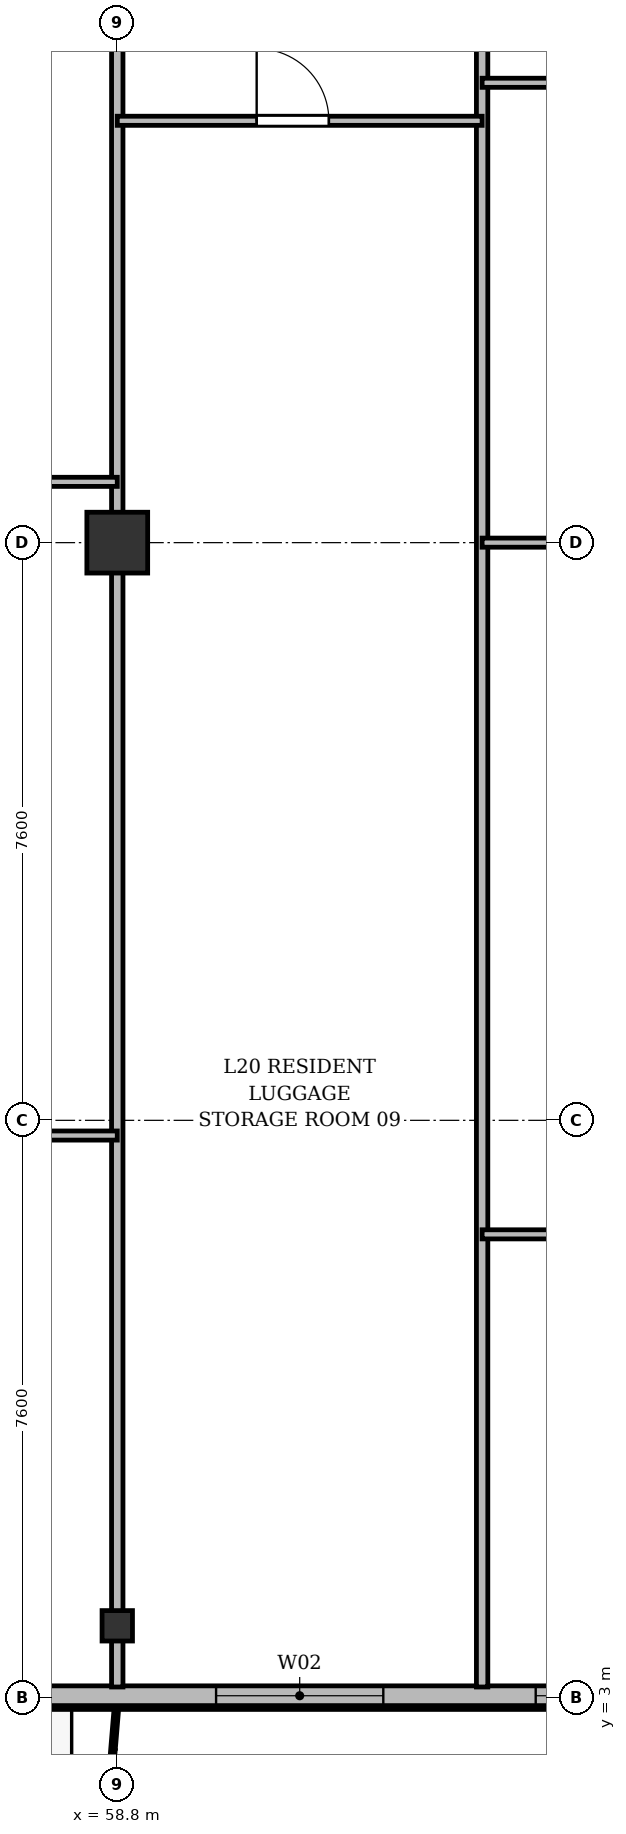
"""IFC4 building model, lengths in metres.
Left out: names, types, materials, properties, quantities, classifications, styles, units other than length and angle.
Written with IfcOpenShell. Run it as: python <this file> out.ifc"""

import sys

from ifc_helpers import new_model, si_unit, direction, frame, frame_2d, origin, origin_2d, place, context, subcontext, project, spatial, rectangle, i_section, extrude, source, transform, mapped, element, fill, save


model = new_model("IFC4")
c1 = context("Model", 3, precision=1e-05, world=origin(), true_north=direction((0.0, 1.0)))
c2 = subcontext(c1, "Body", "Model", "MODEL_VIEW")
j1 = project(units=[si_unit("LENGTHUNIT", "METRE"), si_unit("PLANEANGLEUNIT", "RADIAN")], contexts=[c1])
p1 = place(None, origin())
s1 = spatial("IfcSite", under=j1, at=p1, CompositionType="ELEMENT")
p2 = place(p1, origin())
s2 = spatial("IfcBuilding", under=s1, at=p2, CompositionType="ELEMENT")
p3 = place(p2, frame((0.0, 0.0, 81.7)))
s3 = spatial("IfcBuildingStorey", under=s2, at=p3, CompositionType="ELEMENT", Elevation=81.7)
m1 = source(origin(), c2, "Body", "SweptSolid", [
    extrude(i_section(OverallWidth=0.4, OverallDepth=0.4, WebThickness=0.022, FlangeThickness=0.035, at=origin_2d()), origin(), (0.0, 0.0, 1.0), 3.6),
])
p4 = place(p3, frame((58.8, 3.95, 0.0), z_axis=(0.0, 0.0, 1.0), x_axis=(1.0, 0.0, 0.0)))
e1 = element("IfcColumn", 1, at=p4, inside=s3, PredefinedType="COLUMN", context=c2, shape_type="MappedRepresentation", body=[
    mapped(m1, transform((0.0, 0.0, 0.0), x_axis=(1.0, 0.0, 0.0), y_axis=(0.0, 1.0, 0.0), z_axis=(0.0, 0.0, 1.0), scale=1.0)),
])
m2 = source(origin(), c2, "Body", "SweptSolid", [
    extrude(rectangle(XDim=0.8, YDim=0.8, at=origin_2d()), origin(), (0.0, 0.0, 1.0), 3.6),
])
p5 = place(p3, frame((58.8, 18.2, 0.0), z_axis=(0.0, 0.0, 1.0), x_axis=(1.0, 0.0, 0.0)))
e2 = element("IfcColumn", 2, at=p5, inside=s3, PredefinedType="COLUMN", context=c2, shape_type="MappedRepresentation", body=[
    mapped(m2, transform((0.0, 0.0, 0.0), x_axis=(1.0, 0.0, 0.0), y_axis=(0.0, 1.0, 0.0), z_axis=(0.0, 0.0, 1.0), scale=1.0)),
])
p6 = place(p3, frame((66.9, 3.03, 0.0), z_axis=(0.0, 0.0, 1.0), x_axis=(-1.0, 0.0, 0.0)))
e3 = element("IfcWall", 3, at=p6, inside=s3, PredefinedType="SOLIDWALL", context=c2, shape_type="SweptSolid", body=[
    extrude(rectangle(XDim=59.4, YDim=0.26, at=frame_2d((29.7, 0.0))), origin(), (0.0, 0.0, 1.0), 3.34),
])
p7 = place(p6, frame((0.795, 0.0, 0.9)))
e4 = element("IfcOpeningElement", 4, at=p7, cuts=e3, PredefinedType="OPENING", context=c2, shape_type="SweptSolid", body=[
    extrude(rectangle(XDim=1.8, YDim=1.8, at=frame_2d((0.9, 0.9))), frame((0.0, 0.14, 0.0), z_axis=(0.0, -1.0, 0.0), x_axis=(1.0, 0.0, 0.0)), (0.0, 0.0, 1.0), 0.28),
])
p8 = place(p6, frame((4.6, 0.0, 0.9)))
e5 = element("IfcOpeningElement", 5, at=p8, cuts=e3, PredefinedType="OPENING", context=c2, shape_type="SweptSolid", body=[
    extrude(rectangle(XDim=2.2, YDim=1.8, at=frame_2d((1.1, 0.9))), frame((0.0, 0.14, 0.0), z_axis=(0.0, -1.0, 0.0), x_axis=(1.0, 0.0, 0.0)), (0.0, 0.0, 1.0), 0.28),
])
p9 = place(p6, frame((9.18, 0.0, 0.0)))
e6 = element("IfcOpeningElement", 6, at=p9, cuts=e3, PredefinedType="OPENING", context=c2, shape_type="SweptSolid", body=[
    extrude(rectangle(XDim=1.2, YDim=2.2, at=frame_2d((0.6, 1.1))), frame((0.0, 0.14, 0.0), z_axis=(0.0, -1.0, 0.0), x_axis=(1.0, 0.0, 0.0)), (0.0, 0.0, 1.0), 0.28),
])
p10 = place(p6, frame((12.95, 0.0, 0.9)))
e7 = element("IfcOpeningElement", 7, at=p10, cuts=e3, PredefinedType="OPENING", context=c2, shape_type="SweptSolid", body=[
    extrude(rectangle(XDim=2.0, YDim=1.95, at=frame_2d((1.0, 0.975))), frame((0.0, 0.14, 0.0), z_axis=(0.0, -1.0, 0.0), x_axis=(1.0, 0.0, 0.0)), (0.0, 0.0, 1.0), 0.28),
])
p11 = place(p6, frame((16.275, 0.0, 0.9)))
e8 = element("IfcOpeningElement", 8, at=p11, cuts=e3, PredefinedType="OPENING", context=c2, shape_type="SweptSolid", body=[
    extrude(rectangle(XDim=1.65, YDim=1.85, at=frame_2d((0.825, 0.925))), frame((0.0, 0.14, 0.0), z_axis=(0.0, -1.0, 0.0), x_axis=(1.0, 0.0, 0.0)), (0.0, 0.0, 1.0), 0.28),
])
p12 = place(p6, frame((18.6, 0.0, 0.9)))
e9 = element("IfcOpeningElement", 9, at=p12, cuts=e3, PredefinedType="OPENING", context=c2, shape_type="SweptSolid", body=[
    extrude(rectangle(XDim=1.8, YDim=1.8, at=frame_2d((0.9, 0.9))), frame((0.0, 0.14, 0.0), z_axis=(0.0, -1.0, 0.0), x_axis=(1.0, 0.0, 0.0)), (0.0, 0.0, 1.0), 0.28),
])
p13 = place(p6, frame((21.15, 0.0, 0.9)))
e10 = element("IfcOpeningElement", 10, at=p13, cuts=e3, PredefinedType="OPENING", context=c2, shape_type="SweptSolid", body=[
    extrude(rectangle(XDim=1.5, YDim=1.75, at=frame_2d((0.75, 0.875))), frame((0.0, 0.14, 0.0), z_axis=(0.0, -1.0, 0.0), x_axis=(1.0, 0.0, 0.0)), (0.0, 0.0, 1.0), 0.28),
])
p14 = place(p6, frame((24.1, 0.0, 0.9)))
e11 = element("IfcOpeningElement", 11, at=p14, cuts=e3, PredefinedType="OPENING", context=c2, shape_type="SweptSolid", body=[
    extrude(rectangle(XDim=1.5, YDim=1.75, at=frame_2d((0.75, 0.875))), frame((0.0, 0.14, 0.0), z_axis=(0.0, -1.0, 0.0), x_axis=(1.0, 0.0, 0.0)), (0.0, 0.0, 1.0), 0.28),
])
p15 = place(p6, frame((27.35, 0.0, 0.9)))
e12 = element("IfcOpeningElement", 12, at=p15, cuts=e3, PredefinedType="OPENING", context=c2, shape_type="SweptSolid", body=[
    extrude(rectangle(XDim=2.0, YDim=1.95, at=frame_2d((1.0, 0.975))), frame((0.0, 0.14, 0.0), z_axis=(0.0, -1.0, 0.0), x_axis=(1.0, 0.0, 0.0)), (0.0, 0.0, 1.0), 0.28),
])
p16 = place(p6, frame((32.375, 0.0, 0.9)))
e13 = element("IfcOpeningElement", 13, at=p16, cuts=e3, PredefinedType="OPENING", context=c2, shape_type="SweptSolid", body=[
    extrude(rectangle(XDim=1.65, YDim=1.85, at=frame_2d((0.825, 0.925))), frame((0.0, 0.14, 0.0), z_axis=(0.0, -1.0, 0.0), x_axis=(1.0, 0.0, 0.0)), (0.0, 0.0, 1.0), 0.28),
])
p17 = place(p6, frame((40.301, 0.0, 0.0)))
e14 = element("IfcOpeningElement", 14, at=p17, cuts=e3, PredefinedType="OPENING", context=c2, shape_type="SweptSolid", body=[
    extrude(rectangle(XDim=1.2, YDim=2.2, at=frame_2d((0.6, 1.1))), frame((0.0, 0.14, 0.0), z_axis=(0.0, -1.0, 0.0), x_axis=(1.0, 0.0, 0.0)), (0.0, 0.0, 1.0), 0.28),
])
p18 = place(p6, frame((46.3, 0.0, 0.9)))
e15 = element("IfcOpeningElement", 15, at=p18, cuts=e3, PredefinedType="OPENING", context=c2, shape_type="SweptSolid", body=[
    extrude(rectangle(XDim=2.2, YDim=1.8, at=frame_2d((1.1, 0.9))), frame((0.0, 0.14, 0.0), z_axis=(0.0, -1.0, 0.0), x_axis=(1.0, 0.0, 0.0)), (0.0, 0.0, 1.0), 0.28),
])
p19 = place(p6, frame((54.558, 0.0, 0.0)))
e16 = element("IfcOpeningElement", 16, at=p19, cuts=e3, PredefinedType="OPENING", context=c2, shape_type="SweptSolid", body=[
    extrude(rectangle(XDim=1.2, YDim=2.2, at=frame_2d((0.6, 1.1))), frame((0.0, 0.14, 0.0), z_axis=(0.0, -1.0, 0.0), x_axis=(1.0, 0.0, 0.0)), (0.0, 0.0, 1.0), 0.28),
])
p20 = place(p6, frame((56.805, 0.0, 0.9)))
e17 = element("IfcOpeningElement", 17, at=p20, cuts=e3, PredefinedType="OPENING", context=c2, shape_type="SweptSolid", body=[
    extrude(rectangle(XDim=2.0, YDim=1.95, at=frame_2d((1.0, 0.975))), frame((0.0, 0.14, 0.0), z_axis=(0.0, -1.0, 0.0), x_axis=(1.0, 0.0, 0.0)), (0.0, 0.0, 1.0), 0.28),
])
p21 = place(p3, frame((58.8, 3.145, 0.0), z_axis=(0.0, 0.0, 1.0), x_axis=(0.0, 1.0, 0.0)))
e18 = element("IfcWall", 18, at=p21, inside=s3, PredefinedType="PARTITIONING", context=c2, shape_type="SweptSolid", body=[
    extrude(rectangle(XDim=24.455, YDim=0.15, at=frame_2d((12.228, 0.0))), origin(), (0.0, 0.0, 1.0), 2.84),
])
p22 = place(p3, frame((63.6, 3.145, 0.0), z_axis=(0.0, 0.0, 1.0), x_axis=(0.0, 1.0, 0.0)))
e19 = element("IfcWall", 19, at=p22, inside=s3, PredefinedType="PARTITIONING", context=c2, shape_type="SweptSolid", body=[
    extrude(rectangle(XDim=24.455, YDim=0.15, at=frame_2d((12.228, 0.0))), origin(), (0.0, 0.0, 1.0), 2.752),
])
p23 = place(p3, frame((51.0, 19.0, 0.0), z_axis=(0.0, 0.0, 1.0), x_axis=(1.0, 0.0, 0.0)))
e20 = element("IfcWall", 20, at=p23, inside=s3, PredefinedType="PARTITIONING", context=c2, shape_type="SweptSolid", body=[
    extrude(rectangle(XDim=7.8, YDim=0.12, at=frame_2d((3.9, 0.0))), origin(), (0.0, 0.0, 1.0), 2.84),
])
p24 = place(p23, frame((3.333, 0.0, 0.0)))
e21 = element("IfcOpeningElement", 21, at=p24, cuts=e20, PredefinedType="OPENING", context=c2, shape_type="SweptSolid", body=[
    extrude(rectangle(XDim=0.95, YDim=2.15, at=frame_2d((0.475, 1.075))), frame((0.0, 0.07, 0.0), z_axis=(0.0, -1.0, 0.0), x_axis=(1.0, 0.0, 0.0)), (0.0, 0.0, 1.0), 0.14),
])
p25 = place(p3, frame((54.9, 10.4, 0.0), z_axis=(0.0, 0.0, 1.0), x_axis=(1.0, 0.0, 0.0)))
e22 = element("IfcWall", 22, at=p25, inside=s3, PredefinedType="PARTITIONING", context=c2, shape_type="SweptSolid", body=[
    extrude(rectangle(XDim=3.9, YDim=0.12, at=frame_2d((1.95, 0.0))), origin(), (0.0, 0.0, 1.0), 2.84),
])
p26 = place(p25, frame((1.475, 0.0, 0.0)))
e23 = element("IfcOpeningElement", 23, at=p26, cuts=e22, PredefinedType="OPENING", context=c2, shape_type="SweptSolid", body=[
    extrude(rectangle(XDim=0.95, YDim=2.15, at=frame_2d((0.475, 1.075))), frame((0.0, 0.07, 0.0), z_axis=(0.0, -1.0, 0.0), x_axis=(1.0, 0.0, 0.0)), (0.0, 0.0, 1.0), 0.14),
])
p27 = place(p3, frame((58.8, 23.75, 0.0), z_axis=(0.0, 0.0, 1.0), x_axis=(1.0, 0.0, 0.0)))
e24 = element("IfcWall", 24, at=p27, inside=s3, PredefinedType="PARTITIONING", context=c2, shape_type="SweptSolid", body=[
    extrude(rectangle(XDim=4.8, YDim=0.12, at=frame_2d((2.4, 0.0))), origin(), (0.0, 0.0, 1.0), 2.84),
])
p28 = place(p27, frame((1.834, 0.0, 0.0)))
e25 = element("IfcOpeningElement", 25, at=p28, cuts=e24, PredefinedType="OPENING", context=c2, shape_type="SweptSolid", body=[
    extrude(rectangle(XDim=0.95, YDim=2.15, at=frame_2d((0.475, 1.075))), frame((0.0, 0.07, 0.0), z_axis=(0.0, -1.0, 0.0), x_axis=(1.0, 0.0, 0.0)), (0.0, 0.0, 1.0), 0.14),
])
p29 = place(p3, frame((63.6, 18.2, 0.0), z_axis=(0.0, 0.0, 1.0), x_axis=(1.0, 0.0, 0.0)))
e26 = element("IfcWall", 26, at=p29, inside=s3, PredefinedType="PARTITIONING", context=c2, shape_type="SweptSolid", body=[
    extrude(rectangle(XDim=6.04, YDim=0.12, at=frame_2d((3.02, 0.0))), origin(), (0.0, 0.0, 1.0), 2.752),
])
p30 = place(p29, frame((2.906, 0.0, 0.0)))
e27 = element("IfcOpeningElement", 27, at=p30, cuts=e26, PredefinedType="OPENING", context=c2, shape_type="SweptSolid", body=[
    extrude(rectangle(XDim=0.95, YDim=2.15, at=frame_2d((0.475, 1.075))), frame((0.0, 0.07, 0.0), z_axis=(0.0, -1.0, 0.0), x_axis=(1.0, 0.0, 0.0)), (0.0, 0.0, 1.0), 0.14),
])
p31 = place(p3, frame((63.6, 24.25, 0.0), z_axis=(0.0, 0.0, 1.0), x_axis=(1.0, 0.0, 0.0)))
e28 = element("IfcWall", 28, at=p31, inside=s3, PredefinedType="PARTITIONING", context=c2, shape_type="SweptSolid", body=[
    extrude(rectangle(XDim=2.104, YDim=0.12, at=frame_2d((1.052, 0.0))), origin(), (0.0, 0.0, 1.0), 2.84),
])
p32 = place(p3, frame((63.6, 9.1, 0.0), z_axis=(0.0, 0.0, 1.0), x_axis=(1.0, 0.0, 0.0)))
e29 = element("IfcWall", 29, at=p32, inside=s3, PredefinedType="PARTITIONING", context=c2, shape_type="SweptSolid", body=[
    extrude(rectangle(XDim=6.04, YDim=0.12, at=frame_2d((3.02, 0.0))), origin(), (0.0, 0.0, 1.0), 2.84),
])
p33 = place(p32, frame((2.545, 0.0, 0.0)))
e30 = element("IfcOpeningElement", 30, at=p33, cuts=e29, PredefinedType="OPENING", context=c2, shape_type="SweptSolid", body=[
    extrude(rectangle(XDim=0.95, YDim=2.15, at=frame_2d((0.475, 1.075))), frame((0.0, 0.07, 0.0), z_axis=(0.0, -1.0, 0.0), x_axis=(1.0, 0.0, 0.0)), (0.0, 0.0, 1.0), 0.14),
])
m3 = source(origin(), c2, "Body", "SweptSolid", [
    extrude(rectangle(XDim=1.8, YDim=1.8, at=frame_2d((0.9, 0.9))), frame((0.0, 0.03, 0.0), z_axis=(0.0, -1.0, 0.0), x_axis=(1.0, 0.0, 0.0)), (0.0, 0.0, 1.0), 0.06),
])
p34 = place(p7, origin())
e31 = element("IfcWindow", 31, at=p34, inside=s3, PartitioningType="SINGLE_PANEL", PredefinedType="WINDOW", context=c2, shape_type="MappedRepresentation", body=[
    mapped(m3, transform((0.0, 0.0, 0.0), x_axis=(1.0, 0.0, 0.0), y_axis=(0.0, 1.0, 0.0), z_axis=(0.0, 0.0, 1.0), scale=1.0)),
])
fill(e4, e31)
m4 = source(origin(), c2, "Body", "SweptSolid", [
    extrude(rectangle(XDim=2.2, YDim=1.8, at=frame_2d((1.1, 0.9))), frame((0.0, 0.03, 0.0), z_axis=(0.0, -1.0, 0.0), x_axis=(1.0, 0.0, 0.0)), (0.0, 0.0, 1.0), 0.06),
])
p35 = place(p8, origin())
e32 = element("IfcWindow", 32, at=p35, inside=s3, PartitioningType="SINGLE_PANEL", PredefinedType="WINDOW", context=c2, shape_type="MappedRepresentation", body=[
    mapped(m4, transform((0.0, 0.0, 0.0), x_axis=(1.0, 0.0, 0.0), y_axis=(0.0, 1.0, 0.0), z_axis=(0.0, 0.0, 1.0), scale=1.0)),
])
fill(e5, e32)
m5 = source(origin(), c2, "Body", "SweptSolid", [
    extrude(rectangle(XDim=0.95, YDim=2.15, at=frame_2d((0.475, 1.075))), frame((0.0, 0.025, 0.0), z_axis=(0.0, -1.0, 0.0), x_axis=(1.0, 0.0, 0.0)), (0.0, 0.0, 1.0), 0.05),
])
p36 = place(p28, origin())
e33 = element("IfcDoor", 33, at=p36, inside=s3, OperationType="SINGLE_SWING_LEFT", PredefinedType="DOOR", context=c2, shape_type="MappedRepresentation", body=[
    mapped(m5, transform((0.0, 0.0, 0.0), x_axis=(1.0, 0.0, 0.0), y_axis=(0.0, 1.0, 0.0), z_axis=(0.0, 0.0, 1.0), scale=1.0)),
])
fill(e25, e33)
save(model, sys.argv[1])
